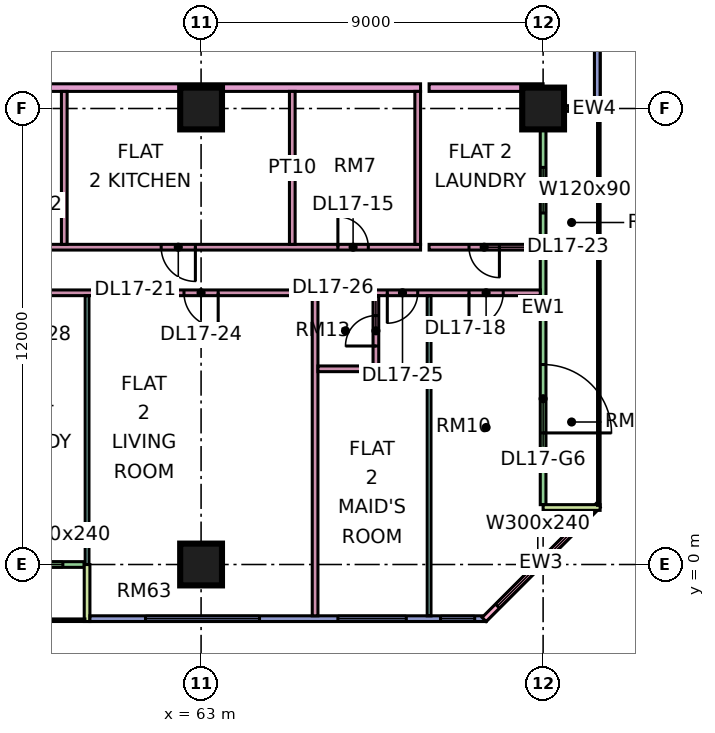
"""IFC4 building model, lengths in metres.
Left out: names, types, materials, properties, quantities, classifications, styles, units other than length and angle.
Written with IfcOpenShell. Run it as: python <this file> out.ifc"""

import sys

from ifc_helpers import new_model, si_unit, direction, frame, frame_2d, origin, origin_2d, place, context, subcontext, project, spatial, rectangle, extrude, element, fill, save


model = new_model("IFC4")
c1 = context("Model", 3, precision=1e-05, world=origin(), true_north=direction((0.0, 1.0)))
c2 = subcontext(c1, "Body", "Model", "MODEL_VIEW")
j1 = project(units=[si_unit("LENGTHUNIT", "METRE"), si_unit("PLANEANGLEUNIT", "RADIAN")], contexts=[c1])
p1 = place(None, origin())
s1 = spatial("IfcSite", under=j1, at=p1, CompositionType="ELEMENT")
p2 = place(p1, origin())
s2 = spatial("IfcBuilding", under=s1, at=p2, CompositionType="ELEMENT")
p3 = place(p2, frame((0.0, 0.0, 78.9)))
s3 = spatial("IfcBuildingStorey", under=s2, at=p3, CompositionType="ELEMENT", Elevation=78.9)
for number, where, z_axis, x_axis in (
    (1, (63.0, 0.0, 0.0), (0.0, 0.0, 1.0), (1.0, 0.0, 0.0)),
    (2, (63.0, 12.0, 0.0), (0.0, 0.0, 1.0), (1.0, 0.0, 0.0)),
    (3, (72.0, 12.0, 0.0), (0.0, 0.0, 1.0), (1.0, 0.0, 0.0)),
):
    element("IfcColumn", number, at=place(p3, frame(where, z_axis=z_axis, x_axis=x_axis)), inside=s3, PredefinedType="COLUMN", context=c2, shape_type="SweptSolid", body=[
        extrude(rectangle(XDim=1.1, YDim=1.1, at=origin_2d()), origin(), (0.0, 0.0, 1.0), 3.75),
    ])
p4 = place(p3, frame((48.075, 0.0, 0.0), z_axis=(0.0, 0.0, 1.0), x_axis=(1.0, 0.0, 0.0)))
e4 = element("IfcWall", 4, at=p4, inside=s3, PredefinedType="SOLIDWALL", context=c2, shape_type="SweptSolid", body=[
    extrude(rectangle(XDim=11.85, YDim=0.15, at=frame_2d((5.925, 0.0))), origin(), (0.0, 0.0, 1.0), 3.35),
])
p5 = place(p4, frame((0.562, 0.0, 0.45)))
e5 = element("IfcOpeningElement", 5, at=p5, cuts=e4, PredefinedType="OPENING", context=c2, shape_type="SweptSolid", body=[
    extrude(rectangle(XDim=1.8, YDim=2.4, at=frame_2d((0.9, 1.2))), frame((0.0, 0.085, 0.0), z_axis=(0.0, -1.0, 0.0), x_axis=(1.0, 0.0, 0.0)), (0.0, 0.0, 1.0), 0.17),
])
p6 = place(p4, frame((3.5, 0.0, 0.45)))
e6 = element("IfcOpeningElement", 6, at=p6, cuts=e4, PredefinedType="OPENING", context=c2, shape_type="SweptSolid", body=[
    extrude(rectangle(XDim=1.2, YDim=2.4, at=frame_2d((0.6, 1.2))), frame((0.0, 0.085, 0.0), z_axis=(0.0, -1.0, 0.0), x_axis=(1.0, 0.0, 0.0)), (0.0, 0.0, 1.0), 0.17),
])
p7 = place(p4, frame((7.15, 0.0, 0.45)))
e7 = element("IfcOpeningElement", 7, at=p7, cuts=e4, PredefinedType="OPENING", context=c2, shape_type="SweptSolid", body=[
    extrude(rectangle(XDim=1.2, YDim=2.4, at=frame_2d((0.6, 1.2))), frame((0.0, 0.085, 0.0), z_axis=(0.0, -1.0, 0.0), x_axis=(1.0, 0.0, 0.0)), (0.0, 0.0, 1.0), 0.17),
])
p8 = place(p4, frame((9.488, 0.0, 0.45)))
e8 = element("IfcOpeningElement", 8, at=p8, cuts=e4, PredefinedType="OPENING", context=c2, shape_type="SweptSolid", body=[
    extrude(rectangle(XDim=1.8, YDim=2.4, at=frame_2d((0.9, 1.2))), frame((0.0, 0.085, 0.0), z_axis=(0.0, -1.0, 0.0), x_axis=(1.0, 0.0, 0.0)), (0.0, 0.0, 1.0), 0.17),
])
p9 = place(p3, frame((60.0, -1.5, 0.0), z_axis=(0.0, 0.0, 1.0), x_axis=(0.0, 1.0, 0.0)))
e9 = element("IfcWall", 9, at=p9, inside=s3, PredefinedType="SOLIDWALL", context=c2, shape_type="SweptSolid", body=[
    extrude(rectangle(XDim=1.5, YDim=0.15, at=frame_2d((0.75, 0.0))), origin(), (0.0, 0.0, 1.0), 3.35),
])
p10 = place(p3, frame((60.075, -1.425, 0.0), z_axis=(0.0, 0.0, 1.0), x_axis=(1.0, 0.0, 0.0)))
e10 = element("IfcWall", 10, at=p10, inside=s3, PredefinedType="SOLIDWALL", context=c2, shape_type="SweptSolid", body=[
    extrude(rectangle(XDim=10.425, YDim=0.15, at=frame_2d((5.212, 0.0))), origin(), (0.0, 0.0, 1.0), 3.35),
])
p11 = place(p10, frame((1.462, 0.0, 0.45)))
e11 = element("IfcOpeningElement", 11, at=p11, cuts=e10, PredefinedType="OPENING", context=c2, shape_type="SweptSolid", body=[
    extrude(rectangle(XDim=3.0, YDim=2.4, at=frame_2d((1.5, 1.2))), frame((0.0, 0.085, 0.0), z_axis=(0.0, -1.0, 0.0), x_axis=(1.0, 0.0, 0.0)), (0.0, 0.0, 1.0), 0.17),
])
p12 = place(p10, frame((6.525, 0.0, 0.45)))
e12 = element("IfcOpeningElement", 12, at=p12, cuts=e10, PredefinedType="OPENING", context=c2, shape_type="SweptSolid", body=[
    extrude(rectangle(XDim=1.8, YDim=2.4, at=frame_2d((0.9, 1.2))), frame((0.0, 0.085, 0.0), z_axis=(0.0, -1.0, 0.0), x_axis=(1.0, 0.0, 0.0)), (0.0, 0.0, 1.0), 0.17),
])
p13 = place(p10, frame((9.225, 0.0, 0.45)))
e13 = element("IfcOpeningElement", 13, at=p13, cuts=e10, PredefinedType="OPENING", context=c2, shape_type="SweptSolid", body=[
    extrude(rectangle(XDim=0.9, YDim=2.4, at=frame_2d((0.45, 1.2))), frame((0.0, 0.085, 0.0), z_axis=(0.0, -1.0, 0.0), x_axis=(1.0, 0.0, 0.0)), (0.0, 0.0, 1.0), 0.17),
])
p14 = place(p3, frame((70.447, -1.447, 0.0), z_axis=(0.0, 0.0, 1.0), x_axis=(0.707106781187, 0.707106781187, 0.0)))
e14 = element("IfcWall", 14, at=p14, inside=s3, PredefinedType="SOLIDWALL", context=c2, shape_type="SweptSolid", body=[
    extrude(rectangle(XDim=4.243, YDim=0.15, at=frame_2d((2.121, 0.0))), origin(), (0.0, 0.0, 1.0), 3.35),
])
p15 = place(p14, frame((0.498, 0.0, 0.45)))
e15 = element("IfcOpeningElement", 15, at=p15, cuts=e14, PredefinedType="OPENING", context=c2, shape_type="SweptSolid", body=[
    extrude(rectangle(XDim=3.0, YDim=2.4, at=frame_2d((1.5, 1.2))), frame((0.0, 0.085, 0.0), z_axis=(0.0, -1.0, 0.0), x_axis=(1.0, 0.0, 0.0)), (0.0, 0.0, 1.0), 0.17),
])
p16 = place(p3, frame((72.0, 1.575, 0.0), z_axis=(0.0, 0.0, 1.0), x_axis=(0.0, 1.0, 0.0)))
e16 = element("IfcWall", 16, at=p16, inside=s3, PredefinedType="SOLIDWALL", context=c2, shape_type="SweptSolid", body=[
    extrude(rectangle(XDim=10.35, YDim=0.15, at=frame_2d((5.175, 0.0))), origin(), (0.0, 0.0, 1.0), 3.35),
])
p17 = place(p16, frame((1.887, 0.0, 0.0)))
e17 = element("IfcOpeningElement", 17, at=p17, cuts=e16, PredefinedType="OPENING", context=c2, shape_type="SweptSolid", body=[
    extrude(rectangle(XDim=1.8, YDim=2.4, at=frame_2d((0.9, 1.2))), frame((0.0, 0.085, 0.0), z_axis=(0.0, -1.0, 0.0), x_axis=(1.0, 0.0, 0.0)), (0.0, 0.0, 1.0), 0.17),
])
p18 = place(p16, frame((7.675, 0.0, 1.7)))
e18 = element("IfcOpeningElement", 18, at=p18, cuts=e16, PredefinedType="OPENING", context=c2, shape_type="SweptSolid", body=[
    extrude(rectangle(XDim=1.2, YDim=0.9, at=frame_2d((0.6, 0.45))), frame((0.0, 0.085, 0.0), z_axis=(0.0, -1.0, 0.0), x_axis=(1.0, 0.0, 0.0)), (0.0, 0.0, 1.0), 0.17),
])
for number, where, z_axis, x_axis in (
    (19, (73.5, 1.5, 0.0), (0.0, 0.0, 1.0), (-1.0, 0.0, 0.0)),
    (20, (73.5, 12.0, 0.0), (0.0, 0.0, 1.0), (-1.0, 0.0, 0.0)),
):
    element("IfcWall", number, at=place(p3, frame(where, z_axis=z_axis, x_axis=x_axis)), inside=s3, PredefinedType="SOLIDWALL", context=c2, shape_type="SweptSolid", body=[
        extrude(rectangle(XDim=1.5, YDim=0.15, at=frame_2d((0.75, 0.0))), origin(), (0.0, 0.0, 1.0), 3.35),
    ])
p19 = place(p3, frame((73.425, 12.075, 0.0), z_axis=(0.0, 0.0, 1.0), x_axis=(0.0, 1.0, 0.0)))
e21 = element("IfcWall", 21, at=p19, inside=s3, PredefinedType="SOLIDWALL", context=c2, shape_type="SweptSolid", body=[
    extrude(rectangle(XDim=10.425, YDim=0.15, at=frame_2d((5.212, 0.0))), origin(), (0.0, 0.0, 1.0), 3.35),
])
p20 = place(p19, frame((6.375, 0.0, 0.45)))
e22 = element("IfcOpeningElement", 22, at=p20, cuts=e21, PredefinedType="OPENING", context=c2, shape_type="SweptSolid", body=[
    extrude(rectangle(XDim=0.9, YDim=2.4, at=frame_2d((0.45, 1.2))), frame((0.0, 0.085, 0.0), z_axis=(0.0, -1.0, 0.0), x_axis=(1.0, 0.0, 0.0)), (0.0, 0.0, 1.0), 0.17),
])
p21 = place(p19, frame((8.175, 0.0, 0.45)))
e23 = element("IfcOpeningElement", 23, at=p21, cuts=e21, PredefinedType="OPENING", context=c2, shape_type="SweptSolid", body=[
    extrude(rectangle(XDim=1.8, YDim=2.4, at=frame_2d((0.9, 1.2))), frame((0.0, 0.085, 0.0), z_axis=(0.0, -1.0, 0.0), x_axis=(1.0, 0.0, 0.0)), (0.0, 0.0, 1.0), 0.17),
])
p22 = place(p3, frame((40.65, 12.55, 0.0), z_axis=(0.0, 0.0, 1.0), x_axis=(1.0, 0.0, 0.0)))
e24 = element("IfcWall", 24, at=p22, inside=s3, PredefinedType="PARTITIONING", context=c2, shape_type="SweptSolid", body=[
    extrude(rectangle(XDim=28.125, YDim=0.2, at=frame_2d((14.062, 0.0))), origin(), (0.0, 0.0, 1.0), 3.35),
])
p23 = place(p22, frame((11.4, 0.0, 0.0)))
e25 = element("IfcOpeningElement", 25, at=p23, cuts=e24, PredefinedType="OPENING", context=c2, shape_type="SweptSolid", body=[
    extrude(rectangle(XDim=1.0, YDim=2.1, at=frame_2d((0.5, 1.05))), frame((0.0, 0.11, 0.0), z_axis=(0.0, -1.0, 0.0), x_axis=(1.0, 0.0, 0.0)), (0.0, 0.0, 1.0), 0.22),
])
p24 = place(p22, frame((1.05, 0.0, 0.0)))
e26 = element("IfcOpeningElement", 26, at=p24, cuts=e24, PredefinedType="OPENING", context=c2, shape_type="SweptSolid", body=[
    extrude(rectangle(XDim=1.0, YDim=2.1, at=frame_2d((0.5, 1.05))), frame((0.0, 0.11, 0.0), z_axis=(0.0, -1.0, 0.0), x_axis=(1.0, 0.0, 0.0)), (0.0, 0.0, 1.0), 0.22),
])
p25 = place(p3, frame((48.1, 7.15, 0.0), z_axis=(0.0, 0.0, 1.0), x_axis=(1.0, 0.0, 0.0)))
e27 = element("IfcWall", 27, at=p25, inside=s3, PredefinedType="PARTITIONING", context=c2, shape_type="SweptSolid", body=[
    extrude(rectangle(XDim=23.826, YDim=0.15, at=frame_2d((11.913, 0.0))), origin(), (0.0, 0.0, 1.0), 3.35),
])
p26 = place(p25, frame((0.95, 0.0, 0.0)))
e28 = element("IfcOpeningElement", 28, at=p26, cuts=e27, PredefinedType="OPENING", context=c2, shape_type="SweptSolid", body=[
    extrude(rectangle(XDim=0.9, YDim=2.1, at=frame_2d((0.45, 1.05))), frame((0.0, 0.085, 0.0), z_axis=(0.0, -1.0, 0.0), x_axis=(1.0, 0.0, 0.0)), (0.0, 0.0, 1.0), 0.17),
])
p27 = place(p25, frame((6.95, 0.0, 0.0)))
e29 = element("IfcOpeningElement", 29, at=p27, cuts=e27, PredefinedType="OPENING", context=c2, shape_type="SweptSolid", body=[
    extrude(rectangle(XDim=0.9, YDim=2.1, at=frame_2d((0.45, 1.05))), frame((0.0, 0.085, 0.0), z_axis=(0.0, -1.0, 0.0), x_axis=(1.0, 0.0, 0.0)), (0.0, 0.0, 1.0), 0.17),
])
p28 = place(p25, frame((21.95, 0.0, 0.0)))
e30 = element("IfcOpeningElement", 30, at=p28, cuts=e27, PredefinedType="OPENING", context=c2, shape_type="SweptSolid", body=[
    extrude(rectangle(XDim=0.9, YDim=2.1, at=frame_2d((0.45, 1.05))), frame((0.0, 0.085, 0.0), z_axis=(0.0, -1.0, 0.0), x_axis=(1.0, 0.0, 0.0)), (0.0, 0.0, 1.0), 0.17),
])
p29 = place(p25, frame((14.45, 0.0, 0.0)))
e31 = element("IfcOpeningElement", 31, at=p29, cuts=e27, PredefinedType="OPENING", context=c2, shape_type="SweptSolid", body=[
    extrude(rectangle(XDim=0.9, YDim=2.1, at=frame_2d((0.45, 1.05))), frame((0.0, 0.085, 0.0), z_axis=(0.0, -1.0, 0.0), x_axis=(1.0, 0.0, 0.0)), (0.0, 0.0, 1.0), 0.17),
])
p30 = place(p25, frame((19.8, 0.0, 0.0)))
e32 = element("IfcOpeningElement", 32, at=p30, cuts=e27, PredefinedType="OPENING", context=c2, shape_type="SweptSolid", body=[
    extrude(rectangle(XDim=0.8, YDim=2.1, at=frame_2d((0.4, 1.05))), frame((0.0, 0.085, 0.0), z_axis=(0.0, -1.0, 0.0), x_axis=(1.0, 0.0, 0.0)), (0.0, 0.0, 1.0), 0.17),
])
p31 = place(p25, frame((3.65, 0.0, 0.0)))
e33 = element("IfcOpeningElement", 33, at=p31, cuts=e27, PredefinedType="OPENING", context=c2, shape_type="SweptSolid", body=[
    extrude(rectangle(XDim=1.6, YDim=2.1, at=frame_2d((0.8, 1.05))), frame((0.0, 0.085, 0.0), z_axis=(0.0, -1.0, 0.0), x_axis=(1.0, 0.0, 0.0)), (0.0, 0.0, 1.0), 0.17),
])
p32 = place(p25, frame((9.95, 0.0, 0.0)))
e34 = element("IfcOpeningElement", 34, at=p32, cuts=e27, PredefinedType="OPENING", context=c2, shape_type="SweptSolid", body=[
    extrude(rectangle(XDim=0.9, YDim=2.1, at=frame_2d((0.45, 1.05))), frame((0.0, 0.085, 0.0), z_axis=(0.0, -1.0, 0.0), x_axis=(1.0, 0.0, 0.0)), (0.0, 0.0, 1.0), 0.17),
])
p33 = place(p3, frame((53.325, 8.35, 0.0), z_axis=(0.0, 0.0, 1.0), x_axis=(1.0, 0.0, 0.0)))
e35 = element("IfcWall", 35, at=p33, inside=s3, PredefinedType="PARTITIONING", context=c2, shape_type="SweptSolid", body=[
    extrude(rectangle(XDim=15.45, YDim=0.15, at=frame_2d((7.725, 0.0))), origin(), (0.0, 0.0, 1.0), 3.35),
])
p34 = place(p33, frame((13.275, 0.0, 0.0)))
e36 = element("IfcOpeningElement", 36, at=p34, cuts=e35, PredefinedType="OPENING", context=c2, shape_type="SweptSolid", body=[
    extrude(rectangle(XDim=0.8, YDim=2.1, at=frame_2d((0.4, 1.05))), frame((0.0, 0.085, 0.0), z_axis=(0.0, -1.0, 0.0), x_axis=(1.0, 0.0, 0.0)), (0.0, 0.0, 1.0), 0.17),
])
p35 = place(p33, frame((8.625, 0.0, 0.0)))
e37 = element("IfcOpeningElement", 37, at=p35, cuts=e35, PredefinedType="OPENING", context=c2, shape_type="SweptSolid", body=[
    extrude(rectangle(XDim=0.9, YDim=2.1, at=frame_2d((0.45, 1.05))), frame((0.0, 0.085, 0.0), z_axis=(0.0, -1.0, 0.0), x_axis=(1.0, 0.0, 0.0)), (0.0, 0.0, 1.0), 0.17),
])
p36 = place(p33, frame((4.525, 0.0, 0.0)))
e38 = element("IfcOpeningElement", 38, at=p36, cuts=e35, PredefinedType="OPENING", context=c2, shape_type="SweptSolid", body=[
    extrude(rectangle(XDim=0.8, YDim=2.1, at=frame_2d((0.4, 1.05))), frame((0.0, 0.085, 0.0), z_axis=(0.0, -1.0, 0.0), x_axis=(1.0, 0.0, 0.0)), (0.0, 0.0, 1.0), 0.17),
])
p37 = place(p3, frame((59.4, 8.425, 0.0), z_axis=(0.0, 0.0, 1.0), x_axis=(0.0, 1.0, 0.0)))
e39 = element("IfcWall", 39, at=p37, inside=s3, PredefinedType="PARTITIONING", context=c2, shape_type="SweptSolid", body=[
    extrude(rectangle(XDim=4.025, YDim=0.15, at=frame_2d((2.012, 0.0))), origin(), (0.0, 0.0, 1.0), 3.35),
])
p38 = place(p3, frame((60.0, 0.0, 0.0), z_axis=(0.0, 0.0, 1.0), x_axis=(0.0, 1.0, 0.0)))
e40 = element("IfcWall", 40, at=p38, inside=s3, PredefinedType="PARTITIONING", context=c2, shape_type="SweptSolid", body=[
    extrude(rectangle(XDim=7.075, YDim=0.1, at=frame_2d((3.538, 0.0))), origin(), (0.0, 0.0, 1.0), 3.35),
])
p39 = place(p3, frame((65.4, 8.425, 0.0), z_axis=(0.0, 0.0, 1.0), x_axis=(0.0, 1.0, 0.0)))
e41 = element("IfcWall", 41, at=p39, inside=s3, PredefinedType="PARTITIONING", context=c2, shape_type="SweptSolid", body=[
    extrude(rectangle(XDim=4.025, YDim=0.15, at=frame_2d((2.012, 0.0))), origin(), (0.0, 0.0, 1.0), 3.35),
])
p40 = place(p3, frame((66.0, -1.35, 0.0), z_axis=(0.0, 0.0, 1.0), x_axis=(0.0, 1.0, 0.0)))
e42 = element("IfcWall", 42, at=p40, inside=s3, PredefinedType="PARTITIONING", context=c2, shape_type="SweptSolid", body=[
    extrude(rectangle(XDim=8.425, YDim=0.15, at=frame_2d((4.212, 0.0))), origin(), (0.0, 0.0, 1.0), 3.35),
])
p41 = place(p3, frame((66.075, 5.15, 0.0), z_axis=(0.0, 0.0, 1.0), x_axis=(1.0, 0.0, 0.0)))
e43 = element("IfcWall", 43, at=p41, inside=s3, PredefinedType="PARTITIONING", context=c2, shape_type="SweptSolid", body=[
    extrude(rectangle(XDim=1.45, YDim=0.15, at=frame_2d((0.725, 0.0))), origin(), (0.0, 0.0, 1.0), 3.35),
])
p42 = place(p3, frame((67.6, 5.075, 0.0), z_axis=(0.0, 0.0, 1.0), x_axis=(0.0, 1.0, 0.0)))
e44 = element("IfcWall", 44, at=p42, inside=s3, PredefinedType="PARTITIONING", context=c2, shape_type="SweptSolid", body=[
    extrude(rectangle(XDim=2.0, YDim=0.15, at=frame_2d((1.0, 0.0))), origin(), (0.0, 0.0, 1.0), 3.35),
])
p43 = place(p42, frame((0.675, 0.0, 0.0)))
e45 = element("IfcOpeningElement", 45, at=p43, cuts=e44, PredefinedType="OPENING", context=c2, shape_type="SweptSolid", body=[
    extrude(rectangle(XDim=0.8, YDim=2.1, at=frame_2d((0.4, 1.05))), frame((0.0, 0.085, 0.0), z_axis=(0.0, -1.0, 0.0), x_axis=(1.0, 0.0, 0.0)), (0.0, 0.0, 1.0), 0.17),
])
p44 = place(p3, frame((68.7, 8.425, 0.0), z_axis=(0.0, 0.0, 1.0), x_axis=(0.0, 1.0, 0.0)))
e46 = element("IfcWall", 46, at=p44, inside=s3, PredefinedType="PARTITIONING", context=c2, shape_type="SweptSolid", body=[
    extrude(rectangle(XDim=4.025, YDim=0.15, at=frame_2d((2.012, 0.0))), origin(), (0.0, 0.0, 1.0), 3.35),
])
p45 = place(p3, frame((69.0, -1.351, 0.0), z_axis=(0.0, 0.0, 1.0), x_axis=(0.0, 1.0, 0.0)))
e47 = element("IfcWall", 47, at=p45, inside=s3, PredefinedType="PARTITIONING", context=c2, shape_type="SweptSolid", body=[
    extrude(rectangle(XDim=8.426, YDim=0.1, at=frame_2d((4.213, 0.0))), origin(), (0.0, 0.0, 1.0), 3.35),
])
p46 = place(p3, frame((69.0, 8.35, 0.0), z_axis=(0.0, 0.0, 1.0), x_axis=(1.0, 0.0, 0.0)))
e48 = element("IfcWall", 48, at=p46, inside=s3, PredefinedType="PARTITIONING", context=c2, shape_type="SweptSolid", body=[
    extrude(rectangle(XDim=2.926, YDim=0.15, at=frame_2d((1.463, 0.0))), origin(), (0.0, 0.0, 1.0), 3.35),
])
p47 = place(p46, frame((1.05, 0.0, 0.0)))
e49 = element("IfcOpeningElement", 49, at=p47, cuts=e48, PredefinedType="OPENING", context=c2, shape_type="SweptSolid", body=[
    extrude(rectangle(XDim=0.8, YDim=2.1, at=frame_2d((0.4, 1.05))), frame((0.0, 0.085, 0.0), z_axis=(0.0, -1.0, 0.0), x_axis=(1.0, 0.0, 0.0)), (0.0, 0.0, 1.0), 0.17),
])
p48 = place(p3, frame((69.0, 12.55, 0.0), z_axis=(0.0, 0.0, 1.0), x_axis=(1.0, 0.0, 0.0)))
e50 = element("IfcWall", 50, at=p48, inside=s3, PredefinedType="PARTITIONING", context=c2, shape_type="SweptSolid", body=[
    extrude(rectangle(XDim=3.0, YDim=0.2, at=frame_2d((1.5, 0.0))), origin(), (0.0, 0.0, 1.0), 3.35),
])
p49 = place(p8, origin())
e51 = element("IfcWindow", 51, at=p49, inside=s3, PartitioningType="SINGLE_PANEL", PredefinedType="WINDOW", context=c2, shape_type="SweptSolid", body=[
    extrude(rectangle(XDim=1.8, YDim=2.4, at=frame_2d((0.9, 1.2))), frame((0.0, 0.03, 0.0), z_axis=(0.0, -1.0, 0.0), x_axis=(1.0, 0.0, 0.0)), (0.0, 0.0, 1.0), 0.06),
])
fill(e8, e51)
p50 = place(p11, origin())
e52 = element("IfcWindow", 52, at=p50, inside=s3, PartitioningType="SINGLE_PANEL", PredefinedType="WINDOW", context=c2, shape_type="SweptSolid", body=[
    extrude(rectangle(XDim=3.0, YDim=2.4, at=frame_2d((1.5, 1.2))), frame((0.0, 0.03, 0.0), z_axis=(0.0, -1.0, 0.0), x_axis=(1.0, 0.0, 0.0)), (0.0, 0.0, 1.0), 0.06),
])
fill(e11, e52)
p51 = place(p12, origin())
e53 = element("IfcWindow", 53, at=p51, inside=s3, PartitioningType="SINGLE_PANEL", PredefinedType="WINDOW", context=c2, shape_type="SweptSolid", body=[
    extrude(rectangle(XDim=1.8, YDim=2.4, at=frame_2d((0.9, 1.2))), frame((0.0, 0.03, 0.0), z_axis=(0.0, -1.0, 0.0), x_axis=(1.0, 0.0, 0.0)), (0.0, 0.0, 1.0), 0.06),
])
fill(e12, e53)
p52 = place(p13, origin())
e54 = element("IfcWindow", 54, at=p52, inside=s3, PartitioningType="SINGLE_PANEL", PredefinedType="WINDOW", context=c2, shape_type="SweptSolid", body=[
    extrude(rectangle(XDim=0.9, YDim=2.4, at=frame_2d((0.45, 1.2))), frame((0.0, 0.03, 0.0), z_axis=(0.0, -1.0, 0.0), x_axis=(1.0, 0.0, 0.0)), (0.0, 0.0, 1.0), 0.06),
])
fill(e13, e54)
p53 = place(p15, origin())
e55 = element("IfcWindow", 55, at=p53, inside=s3, PartitioningType="SINGLE_PANEL", PredefinedType="WINDOW", context=c2, shape_type="SweptSolid", body=[
    extrude(rectangle(XDim=3.0, YDim=2.4, at=frame_2d((1.5, 1.2))), frame((0.0, 0.03, 0.0), z_axis=(0.0, -1.0, 0.0), x_axis=(1.0, 0.0, 0.0)), (0.0, 0.0, 1.0), 0.06),
])
fill(e15, e55)
p54 = place(p17, frame((1.8, 0.0, 0.0), z_axis=(0.0, 0.0, 1.0), x_axis=(-1.0, 0.0, 0.0)))
e56 = element("IfcDoor", 56, at=p54, inside=s3, OperationType="DOUBLE_DOOR_SINGLE_SWING", PredefinedType="DOOR", context=c2, shape_type="SweptSolid", body=[
    extrude(rectangle(XDim=1.8, YDim=2.4, at=frame_2d((0.9, 1.2))), frame((0.0, 0.025, 0.0), z_axis=(0.0, -1.0, 0.0), x_axis=(1.0, 0.0, 0.0)), (0.0, 0.0, 1.0), 0.05),
])
fill(e17, e56)
p55 = place(p18, origin())
e57 = element("IfcWindow", 57, at=p55, inside=s3, PartitioningType="SINGLE_PANEL", PredefinedType="WINDOW", context=c2, shape_type="SweptSolid", body=[
    extrude(rectangle(XDim=1.2, YDim=0.9, at=frame_2d((0.6, 0.45))), frame((0.0, 0.03, 0.0), z_axis=(0.0, -1.0, 0.0), x_axis=(1.0, 0.0, 0.0)), (0.0, 0.0, 1.0), 0.06),
])
fill(e18, e57)
p56 = place(p34, origin())
e58 = element("IfcDoor", 58, at=p56, inside=s3, OperationType="SINGLE_SWING_LEFT", PredefinedType="DOOR", context=c2, shape_type="SweptSolid", body=[
    extrude(rectangle(XDim=0.8, YDim=2.1, at=frame_2d((0.4, 1.05))), frame((0.0, 0.025, 0.0), z_axis=(0.0, -1.0, 0.0), x_axis=(1.0, 0.0, 0.0)), (0.0, 0.0, 1.0), 0.05),
])
fill(e36, e58)
p57 = place(p28, frame((0.9, 0.0, 0.0), z_axis=(0.0, 0.0, 1.0), x_axis=(-1.0, 0.0, 0.0)))
e59 = element("IfcDoor", 59, at=p57, inside=s3, OperationType="SINGLE_SWING_LEFT", PredefinedType="DOOR", context=c2, shape_type="SweptSolid", body=[
    extrude(rectangle(XDim=0.9, YDim=2.1, at=frame_2d((0.45, 1.05))), frame((0.0, 0.025, 0.0), z_axis=(0.0, -1.0, 0.0), x_axis=(1.0, 0.0, 0.0)), (0.0, 0.0, 1.0), 0.05),
])
fill(e30, e59)
p58 = place(p35, origin())
e60 = element("IfcDoor", 60, at=p58, inside=s3, OperationType="SINGLE_SWING_RIGHT", PredefinedType="DOOR", context=c2, shape_type="SweptSolid", body=[
    extrude(rectangle(XDim=0.9, YDim=2.1, at=frame_2d((0.45, 1.05))), frame((0.0, 0.025, 0.0), z_axis=(0.0, -1.0, 0.0), x_axis=(1.0, 0.0, 0.0)), (0.0, 0.0, 1.0), 0.05),
])
fill(e37, e60)
p59 = place(p47, origin())
e61 = element("IfcDoor", 61, at=p59, inside=s3, OperationType="SINGLE_SWING_RIGHT", PredefinedType="DOOR", context=c2, shape_type="SweptSolid", body=[
    extrude(rectangle(XDim=0.8, YDim=2.1, at=frame_2d((0.4, 1.05))), frame((0.0, 0.025, 0.0), z_axis=(0.0, -1.0, 0.0), x_axis=(1.0, 0.0, 0.0)), (0.0, 0.0, 1.0), 0.05),
])
fill(e49, e61)
p60 = place(p29, origin())
e62 = element("IfcDoor", 62, at=p60, inside=s3, OperationType="SINGLE_SWING_RIGHT", PredefinedType="DOOR", context=c2, shape_type="SweptSolid", body=[
    extrude(rectangle(XDim=0.9, YDim=2.1, at=frame_2d((0.45, 1.05))), frame((0.0, 0.025, 0.0), z_axis=(0.0, -1.0, 0.0), x_axis=(1.0, 0.0, 0.0)), (0.0, 0.0, 1.0), 0.05),
])
fill(e31, e62)
p61 = place(p30, frame((0.8, 0.0, 0.0), z_axis=(0.0, 0.0, 1.0), x_axis=(-1.0, 0.0, 0.0)))
e63 = element("IfcDoor", 63, at=p61, inside=s3, OperationType="SINGLE_SWING_LEFT", PredefinedType="DOOR", context=c2, shape_type="SweptSolid", body=[
    extrude(rectangle(XDim=0.8, YDim=2.1, at=frame_2d((0.4, 1.05))), frame((0.0, 0.025, 0.0), z_axis=(0.0, -1.0, 0.0), x_axis=(1.0, 0.0, 0.0)), (0.0, 0.0, 1.0), 0.05),
])
fill(e32, e63)
p62 = place(p43, origin())
e64 = element("IfcDoor", 64, at=p62, inside=s3, OperationType="SINGLE_SWING_LEFT", PredefinedType="DOOR", context=c2, shape_type="SweptSolid", body=[
    extrude(rectangle(XDim=0.8, YDim=2.1, at=frame_2d((0.4, 1.05))), frame((0.0, 0.025, 0.0), z_axis=(0.0, -1.0, 0.0), x_axis=(1.0, 0.0, 0.0)), (0.0, 0.0, 1.0), 0.05),
])
fill(e45, e64)
save(model, sys.argv[1])
